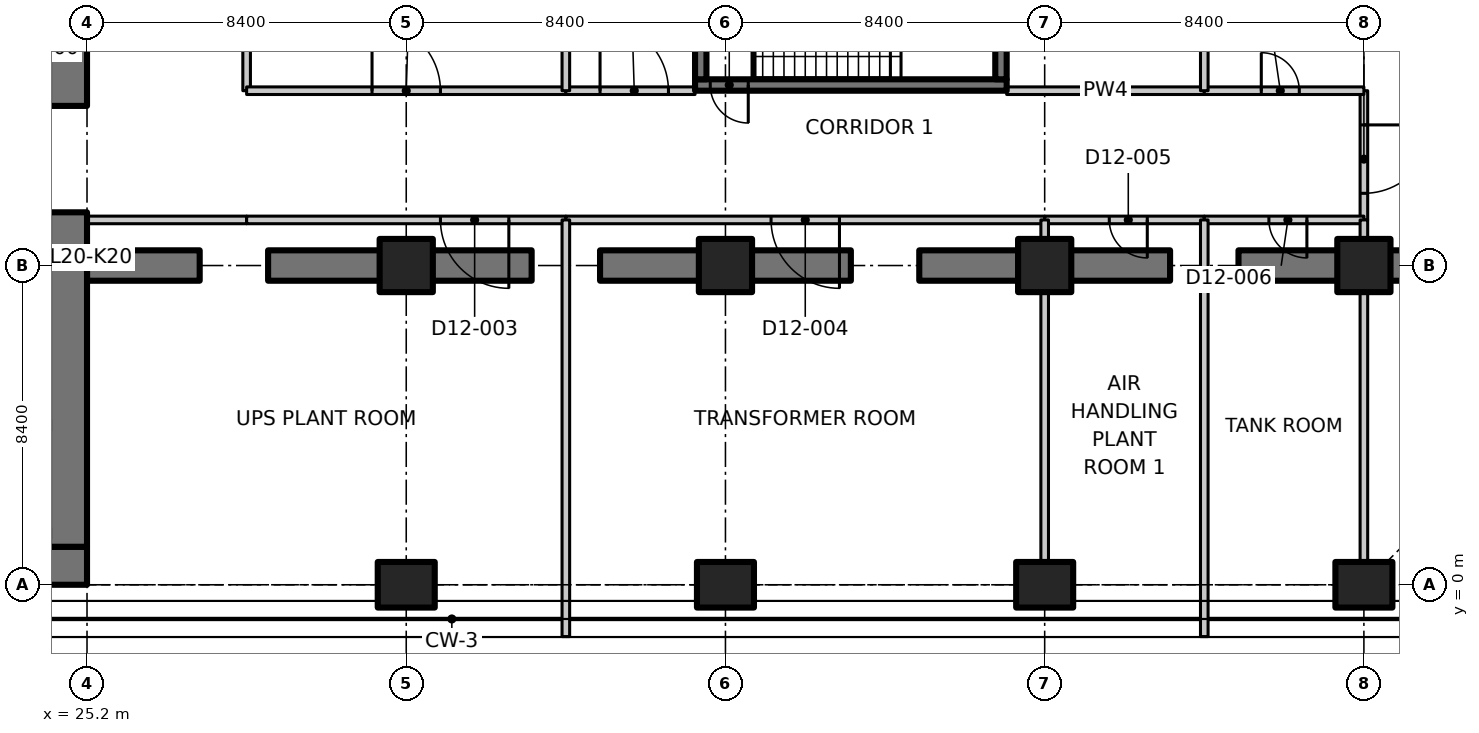
"""IFC4 building model, lengths in metres.
Left out: names, types, materials, properties, quantities, classifications, styles, units other than length and angle.
Written with IfcOpenShell. Run it as: python <this file> out.ifc"""

import sys

from ifc_helpers import new_model, si_unit, direction, frame, frame_2d, origin, origin_2d, place, context, subcontext, project, spatial, polyline, rectangle, outline, extrude, element, fill, save


model = new_model("IFC4")
c1 = context("Model", 3, precision=1e-05, world=origin(), true_north=direction((0.0, 1.0)))
c2 = subcontext(c1, "Body", "Model", "MODEL_VIEW")
j1 = project(units=[si_unit("LENGTHUNIT", "METRE"), si_unit("PLANEANGLEUNIT", "RADIAN")], contexts=[c1])
p1 = place(None, origin())
s1 = spatial("IfcSite", under=j1, at=p1, CompositionType="ELEMENT")
p2 = place(p1, origin())
s2 = spatial("IfcBuilding", under=s1, at=p2, CompositionType="ELEMENT")
p3 = place(p2, frame((0.0, 0.0, 86.9)))
s3 = spatial("IfcBuildingStorey", under=s2, at=p3, CompositionType="ELEMENT", Elevation=86.9)
p4 = place(p3, frame((33.6, 0.0, 0.0), z_axis=(0.0, 0.0, 1.0), x_axis=(0.0, 1.0, 0.0)))
e1 = element("IfcColumn", 1, at=p4, inside=s3, PredefinedType="COLUMN", context=c2, shape_type="SweptSolid", body=[
    extrude(rectangle(XDim=1.2, YDim=1.5, at=origin_2d()), origin(), (0.0, 0.0, 1.0), 4.55),
])
p5 = place(p3, frame((33.6, 8.4, 0.0), z_axis=(0.0, 0.0, 1.0), x_axis=(1.0, 0.0, 0.0)))
e2 = element("IfcColumn", 2, at=p5, inside=s3, PredefinedType="COLUMN", context=c2, shape_type="SweptSolid", body=[
    extrude(rectangle(XDim=1.4, YDim=1.4, at=origin_2d()), origin(), (0.0, 0.0, 1.0), 4.55),
])
p6 = place(p3, frame((42.0, 0.0, 0.0), z_axis=(0.0, 0.0, 1.0), x_axis=(0.0, 1.0, 0.0)))
e3 = element("IfcColumn", 3, at=p6, inside=s3, PredefinedType="COLUMN", context=c2, shape_type="SweptSolid", body=[
    extrude(rectangle(XDim=1.2, YDim=1.5, at=origin_2d()), origin(), (0.0, 0.0, 1.0), 4.55),
])
p7 = place(p3, frame((42.0, 8.4, 0.0), z_axis=(0.0, 0.0, 1.0), x_axis=(1.0, 0.0, 0.0)))
e4 = element("IfcColumn", 4, at=p7, inside=s3, PredefinedType="COLUMN", context=c2, shape_type="SweptSolid", body=[
    extrude(rectangle(XDim=1.4, YDim=1.4, at=origin_2d()), origin(), (0.0, 0.0, 1.0), 4.55),
])
p8 = place(p3, frame((50.4, 0.0, 0.0), z_axis=(0.0, 0.0, 1.0), x_axis=(0.0, 1.0, 0.0)))
e5 = element("IfcColumn", 5, at=p8, inside=s3, PredefinedType="COLUMN", context=c2, shape_type="SweptSolid", body=[
    extrude(rectangle(XDim=1.2, YDim=1.5, at=origin_2d()), origin(), (0.0, 0.0, 1.0), 4.55),
])
p9 = place(p3, frame((50.4, 8.4, 0.0), z_axis=(0.0, 0.0, 1.0), x_axis=(1.0, 0.0, 0.0)))
e6 = element("IfcColumn", 6, at=p9, inside=s3, PredefinedType="COLUMN", context=c2, shape_type="SweptSolid", body=[
    extrude(rectangle(XDim=1.4, YDim=1.4, at=origin_2d()), origin(), (0.0, 0.0, 1.0), 4.55),
])
p10 = place(p3, frame((58.8, 0.0, 0.0), z_axis=(0.0, 0.0, 1.0), x_axis=(0.0, 1.0, 0.0)))
e7 = element("IfcColumn", 7, at=p10, inside=s3, PredefinedType="COLUMN", context=c2, shape_type="SweptSolid", body=[
    extrude(rectangle(XDim=1.2, YDim=1.5, at=origin_2d()), origin(), (0.0, 0.0, 1.0), 4.55),
])
p11 = place(p3, frame((58.8, 8.4, 0.0), z_axis=(0.0, 0.0, 1.0), x_axis=(1.0, 0.0, 0.0)))
e8 = element("IfcColumn", 8, at=p11, inside=s3, PredefinedType="COLUMN", context=c2, shape_type="SweptSolid", body=[
    extrude(rectangle(XDim=1.4, YDim=1.4, at=origin_2d()), origin(), (0.0, 0.0, 1.0), 4.55),
])
p12 = place(p3, frame((25.2, 8.4, 0.0), z_axis=(0.0, 0.0, 1.0), x_axis=(1.0, 0.0, 0.0)))
e9 = element("IfcWall", 9, at=p12, inside=s3, PredefinedType="SHEAR", context=c2, shape_type="SweptSolid", body=[
    extrude(rectangle(XDim=2.965, YDim=0.8, at=frame_2d((1.482, 0.0))), origin(), (0.0, 0.0, 1.0), 4.55),
])
p13 = place(p3, frame((29.965, 8.4, 0.0), z_axis=(0.0, 0.0, 1.0), x_axis=(1.0, 0.0, 0.0)))
e10 = element("IfcWall", 10, at=p13, inside=s3, PredefinedType="SHEAR", context=c2, shape_type="SweptSolid", body=[
    extrude(rectangle(XDim=2.965, YDim=0.8, at=frame_2d((1.482, 0.0))), origin(), (0.0, 0.0, 1.0), 4.55),
])
p14 = place(p3, frame((34.27, 8.4, 0.0), z_axis=(0.0, 0.0, 1.0), x_axis=(1.0, 0.0, 0.0)))
e11 = element("IfcWall", 11, at=p14, inside=s3, PredefinedType="SHEAR", context=c2, shape_type="SweptSolid", body=[
    extrude(rectangle(XDim=2.63, YDim=0.8, at=frame_2d((1.315, 0.0))), origin(), (0.0, 0.0, 1.0), 4.55),
])
for number, where, z_axis, x_axis in (
    (12, (38.7, 8.4, 0.0), (0.0, 0.0, 1.0), (1.0, 0.0, 0.0)),
    (13, (42.67, 8.4, 0.0), (0.0, 0.0, 1.0), (1.0, 0.0, 0.0)),
):
    element("IfcWall", number, at=place(p3, frame(where, z_axis=z_axis, x_axis=x_axis)), inside=s3, PredefinedType="SHEAR", context=c2, shape_type="SweptSolid", body=[
        extrude(rectangle(XDim=2.63, YDim=0.8, at=frame_2d((1.315, 0.0))), origin(), (0.0, 0.0, 1.0), 4.55),
    ])
for number, where, z_axis, x_axis in (
    (14, (47.1, 8.4, 0.0), (0.0, 0.0, 1.0), (1.0, 0.0, 0.0)),
    (15, (51.07, 8.4, 0.0), (0.0, 0.0, 1.0), (1.0, 0.0, 0.0)),
    (16, (55.5, 8.4, 0.0), (0.0, 0.0, 1.0), (1.0, 0.0, 0.0)),
):
    element("IfcWall", number, at=place(p3, frame(where, z_axis=z_axis, x_axis=x_axis)), inside=s3, PredefinedType="SHEAR", context=c2, shape_type="SweptSolid", body=[
        extrude(rectangle(XDim=2.63, YDim=0.8, at=frame_2d((1.315, 0.0))), origin(), (0.0, 0.0, 1.0), 4.55),
    ])
p15 = place(p3, frame((59.47, 8.4, 0.0), z_axis=(0.0, 0.0, 1.0), x_axis=(1.0, 0.0, 0.0)))
e17 = element("IfcWall", 17, at=p15, inside=s3, PredefinedType="SHEAR", context=c2, shape_type="SweptSolid", body=[
    extrude(rectangle(XDim=2.655, YDim=0.8, at=frame_2d((1.328, 0.0))), origin(), (0.0, 0.0, 1.0), 4.55),
])
p16 = place(p3, frame((6.936, 0.5, 0.0), z_axis=(0.0, 0.0, 1.0), x_axis=(1.0, 0.0, 0.0)))
e18 = element("IfcWall", 18, at=p16, inside=s3, PredefinedType="SHEAR", context=c2, shape_type="SweptSolid", body=[
    extrude(rectangle(XDim=18.264, YDim=1.0, at=frame_2d((9.132, 0.0))), origin(), (0.0, 0.0, 1.0), 4.55),
])
p17 = place(p3, frame((24.7, 1.0, 0.0), z_axis=(0.0, 0.0, 1.0), x_axis=(0.0, 1.0, 0.0)))
e19 = element("IfcWall", 19, at=p17, inside=s3, PredefinedType="SHEAR", context=c2, shape_type="SweptSolid", body=[
    extrude(rectangle(XDim=8.8, YDim=1.0, at=frame_2d((4.4, 0.0))), origin(), (0.0, 0.0, 1.0), 4.55),
])
p18 = place(p3, frame((24.7, 12.6, 0.0), z_axis=(0.0, 0.0, 1.0), x_axis=(0.0, 1.0, 0.0)))
e20 = element("IfcWall", 20, at=p18, inside=s3, PredefinedType="SHEAR", context=c2, shape_type="SweptSolid", body=[
    extrude(rectangle(XDim=3.2, YDim=1.0, at=frame_2d((1.6, 0.0))), origin(), (0.0, 0.0, 1.0), 4.55),
])
p19 = place(p3, frame((49.4, 13.15, 0.0), z_axis=(0.0, 0.0, 1.0), x_axis=(-1.0, 0.0, 0.0)))
e21 = element("IfcWall", 21, at=p19, inside=s3, PredefinedType="SHEAR", context=c2, shape_type="SweptSolid", body=[
    extrude(rectangle(XDim=8.2, YDim=0.3, at=frame_2d((4.1, 0.0))), origin(), (0.0, 0.0, 1.0), 4.55),
])
p20 = place(p19, frame((6.8, 0.0, 0.0)))
e22 = element("IfcOpeningElement", 22, at=p20, cuts=e21, PredefinedType="OPENING", context=c2, shape_type="SweptSolid", body=[
    extrude(rectangle(XDim=1.0, YDim=2.1, at=frame_2d((0.5, 1.05))), frame((0.0, 0.16, 0.0), z_axis=(0.0, -1.0, 0.0), x_axis=(1.0, 0.0, 0.0)), (0.0, 0.0, 1.0), 0.32),
])
for number, where, z_axis, x_axis in (
    (23, (41.35, 13.3, 0.0), (0.0, 0.0, 1.0), (0.0, 1.0, 0.0)),
    (24, (49.25, 13.3, 0.0), (0.0, 0.0, 1.0), (0.0, 1.0, 0.0)),
):
    element("IfcWall", number, at=place(p3, frame(where, z_axis=z_axis, x_axis=x_axis)), inside=s3, PredefinedType="SHEAR", context=c2, shape_type="SweptSolid", body=[
        extrude(rectangle(XDim=2.55, YDim=0.3, at=frame_2d((1.275, 0.0))), origin(), (0.0, 0.0, 1.0), 4.55),
    ])
p21 = place(p3, frame((29.4, 9.6, 0.0), z_axis=(0.0, 0.0, 1.0), x_axis=(-1.0, 0.0, 0.0)))
e25 = element("IfcWall", 25, at=p21, inside=s3, PredefinedType="PARTITIONING", context=c2, shape_type="SweptSolid", body=[
    extrude(rectangle(XDim=4.2, YDim=0.2, at=frame_2d((2.1, 0.0))), origin(), (0.0, 0.0, 1.0), 4.53),
])
p22 = place(p3, frame((29.4, 21.2, 0.0), z_axis=(0.0, 0.0, 1.0), x_axis=(0.0, -1.0, 0.0)))
e26 = element("IfcWall", 26, at=p22, inside=s3, PredefinedType="PARTITIONING", context=c2, shape_type="SweptSolid", body=[
    extrude(rectangle(XDim=8.2, YDim=0.2, at=frame_2d((4.1, 0.0))), origin(), (0.0, 0.0, 1.0), 4.53),
])
p23 = place(p3, frame((58.8, 13.0, 0.0), z_axis=(0.0, 0.0, 1.0), x_axis=(0.0, -1.0, 0.0)))
e27 = element("IfcWall", 27, at=p23, inside=s3, PredefinedType="PARTITIONING", context=c2, shape_type="SweptSolid", body=[
    extrude(rectangle(XDim=3.4, YDim=0.2, at=frame_2d((1.7, 0.0))), origin(), (0.0, 0.0, 1.0), 4.53),
])
p24 = place(p23, frame((0.9, 0.0, 0.0)))
e28 = element("IfcOpeningElement", 28, at=p24, cuts=e27, PredefinedType="OPENING", context=c2, shape_type="SweptSolid", body=[
    extrude(rectangle(XDim=1.8, YDim=2.1, at=frame_2d((0.9, 1.05))), frame((0.0, 0.11, 0.0), z_axis=(0.0, -1.0, 0.0), x_axis=(1.0, 0.0, 0.0)), (0.0, 0.0, 1.0), 0.22),
])
p25 = place(p3, frame((37.8, 9.6, 0.0), z_axis=(0.0, 0.0, 1.0), x_axis=(-1.0, 0.0, 0.0)))
e29 = element("IfcWall", 29, at=p25, inside=s3, PredefinedType="PARTITIONING", context=c2, shape_type="SweptSolid", body=[
    extrude(rectangle(XDim=8.4, YDim=0.2, at=frame_2d((4.2, 0.0))), origin(), (0.0, 0.0, 1.0), 4.53),
])
p26 = place(p25, frame((1.5, 0.0, 0.0)))
e30 = element("IfcOpeningElement", 30, at=p26, cuts=e29, PredefinedType="OPENING", context=c2, shape_type="SweptSolid", body=[
    extrude(rectangle(XDim=1.8, YDim=2.1, at=frame_2d((0.9, 1.05))), frame((0.0, 0.11, 0.0), z_axis=(0.0, -1.0, 0.0), x_axis=(1.0, 0.0, 0.0)), (0.0, 0.0, 1.0), 0.22),
])
p27 = place(p3, frame((50.4, 9.6, 0.0), z_axis=(0.0, 0.0, 1.0), x_axis=(-1.0, 0.0, 0.0)))
e31 = element("IfcWall", 31, at=p27, inside=s3, PredefinedType="PARTITIONING", context=c2, shape_type="SweptSolid", body=[
    extrude(rectangle(XDim=12.6, YDim=0.2, at=frame_2d((6.3, 0.0))), origin(), (0.0, 0.0, 1.0), 4.53),
])
p28 = place(p27, frame((5.4, 0.0, 0.0)))
e32 = element("IfcOpeningElement", 32, at=p28, cuts=e31, PredefinedType="OPENING", context=c2, shape_type="SweptSolid", body=[
    extrude(rectangle(XDim=1.8, YDim=2.1, at=frame_2d((0.9, 1.05))), frame((0.0, 0.11, 0.0), z_axis=(0.0, -1.0, 0.0), x_axis=(1.0, 0.0, 0.0)), (0.0, 0.0, 1.0), 0.22),
])
p29 = place(p3, frame((54.6, 9.6, 0.0), z_axis=(0.0, 0.0, 1.0), x_axis=(-1.0, 0.0, 0.0)))
e33 = element("IfcWall", 33, at=p29, inside=s3, PredefinedType="PARTITIONING", context=c2, shape_type="SweptSolid", body=[
    extrude(rectangle(XDim=4.2, YDim=0.2, at=frame_2d((2.1, 0.0))), origin(), (0.0, 0.0, 1.0), 4.53),
])
p30 = place(p29, frame((1.5, 0.0, 0.0)))
e34 = element("IfcOpeningElement", 34, at=p30, cuts=e33, PredefinedType="OPENING", context=c2, shape_type="SweptSolid", body=[
    extrude(rectangle(XDim=1.0, YDim=2.1, at=frame_2d((0.5, 1.05))), frame((0.0, 0.11, 0.0), z_axis=(0.0, -1.0, 0.0), x_axis=(1.0, 0.0, 0.0)), (0.0, 0.0, 1.0), 0.22),
])
p31 = place(p3, frame((58.8, 9.6, 0.0), z_axis=(0.0, 0.0, 1.0), x_axis=(-1.0, 0.0, 0.0)))
e35 = element("IfcWall", 35, at=p31, inside=s3, PredefinedType="PARTITIONING", context=c2, shape_type="SweptSolid", body=[
    extrude(rectangle(XDim=4.2, YDim=0.2, at=frame_2d((2.1, 0.0))), origin(), (0.0, 0.0, 1.0), 4.53),
])
p32 = place(p31, frame((1.5, 0.0, 0.0)))
e36 = element("IfcOpeningElement", 36, at=p32, cuts=e35, PredefinedType="OPENING", context=c2, shape_type="SweptSolid", body=[
    extrude(rectangle(XDim=1.0, YDim=2.1, at=frame_2d((0.5, 1.05))), frame((0.0, 0.11, 0.0), z_axis=(0.0, -1.0, 0.0), x_axis=(1.0, 0.0, 0.0)), (0.0, 0.0, 1.0), 0.22),
])
p33 = place(p3, frame((29.4, 13.0, 0.0), z_axis=(0.0, 0.0, 1.0), x_axis=(1.0, 0.0, 0.0)))
e37 = element("IfcWall", 37, at=p33, inside=s3, PredefinedType="PARTITIONING", context=c2, shape_type="SweptSolid", body=[
    extrude(rectangle(XDim=8.4, YDim=0.2, at=frame_2d((4.2, 0.0))), origin(), (0.0, 0.0, 1.0), 4.53),
])
p34 = place(p33, frame((3.3, 0.0, 0.0)))
e38 = element("IfcOpeningElement", 38, at=p34, cuts=e37, PredefinedType="OPENING", context=c2, shape_type="SweptSolid", body=[
    extrude(rectangle(XDim=1.8, YDim=2.1, at=frame_2d((0.9, 1.05))), frame((0.0, 0.11, 0.0), z_axis=(0.0, -1.0, 0.0), x_axis=(1.0, 0.0, 0.0)), (0.0, 0.0, 1.0), 0.22),
])
p35 = place(p3, frame((37.8, 13.0, 0.0), z_axis=(0.0, 0.0, 1.0), x_axis=(1.0, 0.0, 0.0)))
e39 = element("IfcWall", 39, at=p35, inside=s3, PredefinedType="PARTITIONING", context=c2, shape_type="SweptSolid", body=[
    extrude(rectangle(XDim=3.4, YDim=0.2, at=frame_2d((1.7, 0.0))), origin(), (0.0, 0.0, 1.0), 4.53),
])
p36 = place(p35, frame((0.9, 0.0, 0.0)))
e40 = element("IfcOpeningElement", 40, at=p36, cuts=e39, PredefinedType="OPENING", context=c2, shape_type="SweptSolid", body=[
    extrude(rectangle(XDim=1.8, YDim=2.1, at=frame_2d((0.9, 1.05))), frame((0.0, 0.11, 0.0), z_axis=(0.0, -1.0, 0.0), x_axis=(1.0, 0.0, 0.0)), (0.0, 0.0, 1.0), 0.22),
])
p37 = place(p3, frame((49.4, 13.0, 0.0), z_axis=(0.0, 0.0, 1.0), x_axis=(1.0, 0.0, 0.0)))
e41 = element("IfcWall", 41, at=p37, inside=s3, PredefinedType="PARTITIONING", context=c2, shape_type="SweptSolid", body=[
    extrude(rectangle(XDim=5.2, YDim=0.2, at=frame_2d((2.6, 0.0))), origin(), (0.0, 0.0, 1.0), 4.53),
])
p38 = place(p3, frame((54.6, 13.0, 0.0), z_axis=(0.0, 0.0, 1.0), x_axis=(1.0, 0.0, 0.0)))
e42 = element("IfcWall", 42, at=p38, inside=s3, PredefinedType="PARTITIONING", context=c2, shape_type="SweptSolid", body=[
    extrude(rectangle(XDim=4.2, YDim=0.2, at=frame_2d((2.1, 0.0))), origin(), (0.0, 0.0, 1.0), 4.53),
])
p39 = place(p38, frame((1.5, 0.0, 0.0)))
e43 = element("IfcOpeningElement", 43, at=p39, cuts=e42, PredefinedType="OPENING", context=c2, shape_type="SweptSolid", body=[
    extrude(rectangle(XDim=1.0, YDim=2.1, at=frame_2d((0.5, 1.05))), frame((0.0, 0.11, 0.0), z_axis=(0.0, -1.0, 0.0), x_axis=(1.0, 0.0, 0.0)), (0.0, 0.0, 1.0), 0.22),
])
p40 = place(p3, frame((58.8, 0.62, 0.0), z_axis=(0.0, 0.0, 1.0), x_axis=(0.0, 1.0, 0.0)))
e44 = element("IfcWall", 44, at=p40, inside=s3, PredefinedType="PARTITIONING", context=c2, shape_type="SweptSolid", body=[
    extrude(outline(polyline([(0.0, 0.0), (7.06, 0.0), (7.06, 4.53), (0.096, 4.53), (0.094, 4.18), (0.0, 4.18), (0.0, 0.0)])), frame((0.0, 0.1, 0.0), z_axis=(0.0, -1.0, 0.0), x_axis=(1.0, 0.0, 0.0)), (0.0, 0.0, 1.0), 0.2),
])
p41 = place(p3, frame((58.8, 9.12, 0.0), z_axis=(0.0, 0.0, 1.0), x_axis=(0.0, 1.0, 0.0)))
e45 = element("IfcWall", 45, at=p41, inside=s3, PredefinedType="PARTITIONING", context=c2, shape_type="SweptSolid", body=[
    extrude(rectangle(XDim=0.48, YDim=0.2, at=frame_2d((0.24, 0.0))), origin(), (0.0, 0.0, 1.0), 4.53),
])
p42 = place(p3, frame((37.8, 9.6, 0.0), z_axis=(0.0, 0.0, 1.0), x_axis=(0.0, -1.0, 0.0)))
e46 = element("IfcWall", 46, at=p42, inside=s3, PredefinedType="PARTITIONING", context=c2, shape_type="SweptSolid", body=[
    extrude(outline(polyline([(0.0, 0.0), (10.963, 0.0), (10.963, 4.53), (10.7, 4.53), (10.05, 4.53), (10.048, 4.18), (9.152, 4.18), (9.15, 4.53), (0.0, 4.53), (0.0, 0.0)])), frame((0.0, 0.1, 0.0), z_axis=(0.0, -1.0, 0.0), x_axis=(1.0, 0.0, 0.0)), (0.0, 0.0, 1.0), 0.2),
])
p43 = place(p3, frame((50.4, 9.6, 0.0), z_axis=(0.0, 0.0, 1.0), x_axis=(0.0, -1.0, 0.0)))
e47 = element("IfcWall", 47, at=p43, inside=s3, PredefinedType="PARTITIONING", context=c2, shape_type="SweptSolid", body=[
    extrude(rectangle(XDim=0.48, YDim=0.2, at=frame_2d((0.24, 0.0))), origin(), (0.0, 0.0, 1.0), 4.53),
])
p44 = place(p3, frame((50.4, 7.68, 0.0), z_axis=(0.0, 0.0, 1.0), x_axis=(0.0, -1.0, 0.0)))
e48 = element("IfcWall", 48, at=p44, inside=s3, PredefinedType="PARTITIONING", context=c2, shape_type="SweptSolid", body=[
    extrude(rectangle(XDim=7.06, YDim=0.2, at=frame_2d((3.53, 0.0))), origin(), (0.0, 0.0, 1.0), 4.53),
])
p45 = place(p3, frame((54.6, 9.6, 0.0), z_axis=(0.0, 0.0, 1.0), x_axis=(0.0, -1.0, 0.0)))
e49 = element("IfcWall", 49, at=p45, inside=s3, PredefinedType="PARTITIONING", context=c2, shape_type="SweptSolid", body=[
    extrude(outline(polyline([(0.0, 0.0), (10.963, 0.0), (10.963, 4.53), (10.7, 4.53), (10.05, 4.53), (10.048, 4.18), (9.152, 4.18), (9.15, 4.53), (0.0, 4.53), (0.0, 0.0)])), frame((0.0, 0.1, 0.0), z_axis=(0.0, -1.0, 0.0), x_axis=(1.0, 0.0, 0.0)), (0.0, 0.0, 1.0), 0.2),
])
p46 = place(p3, frame((37.8, 30.243, 0.0), z_axis=(0.0, 0.0, 1.0), x_axis=(0.0, -1.0, 0.0)))
e50 = element("IfcWall", 50, at=p46, inside=s3, PredefinedType="PARTITIONING", context=c2, shape_type="SweptSolid", body=[
    extrude(outline(polyline([(0.0, 0.0), (17.243, 0.0), (17.243, 4.53), (5.493, 4.53), (5.491, 4.18), (4.595, 4.18), (4.593, 4.53), (0.0, 4.53), (0.0, 0.0)])), frame((0.0, 0.1, 0.0), z_axis=(0.0, -1.0, 0.0), x_axis=(1.0, 0.0, 0.0)), (0.0, 0.0, 1.0), 0.2),
])
p47 = place(p3, frame((54.6, 26.375, 0.0), z_axis=(0.0, 0.0, 1.0), x_axis=(0.0, -1.0, 0.0)))
e51 = element("IfcWall", 51, at=p47, inside=s3, PredefinedType="PARTITIONING", context=c2, shape_type="SweptSolid", body=[
    extrude(outline(polyline([(0.0, 0.0), (13.375, 0.0), (13.375, 4.53), (1.625, 4.53), (1.624, 4.18), (0.728, 4.18), (0.726, 4.53), (0.075, 4.53), (0.0, 4.53), (0.0, 0.0)])), frame((0.0, 0.1, 0.0), z_axis=(0.0, -1.0, 0.0), x_axis=(1.0, 0.0, 0.0)), (0.0, 0.0, 1.0), 0.2),
])
p48 = place(p20, origin())
e52 = element("IfcDoor", 52, at=p48, inside=s3, OperationType="SINGLE_SWING_LEFT", PredefinedType="DOOR", context=c2, shape_type="SweptSolid", body=[
    extrude(rectangle(XDim=1.0, YDim=2.1, at=frame_2d((0.5, 1.05))), frame((0.0, 0.025, 0.0), z_axis=(0.0, -1.0, 0.0), x_axis=(1.0, 0.0, 0.0)), (0.0, 0.0, 1.0), 0.05),
])
fill(e22, e52)
p49 = place(p24, origin())
e53 = element("IfcDoor", 53, at=p49, inside=s3, OperationType="DOUBLE_DOOR_SINGLE_SWING", PredefinedType="DOOR", context=c2, shape_type="SweptSolid", body=[
    extrude(rectangle(XDim=1.8, YDim=2.1, at=frame_2d((0.9, 1.05))), frame((0.0, 0.025, 0.0), z_axis=(0.0, -1.0, 0.0), x_axis=(1.0, 0.0, 0.0)), (0.0, 0.0, 1.0), 0.05),
])
fill(e28, e53)
p50 = place(p26, origin())
e54 = element("IfcDoor", 54, at=p50, inside=s3, OperationType="DOUBLE_DOOR_SINGLE_SWING", PredefinedType="DOOR", context=c2, shape_type="SweptSolid", body=[
    extrude(rectangle(XDim=1.8, YDim=2.1, at=frame_2d((0.9, 1.05))), frame((0.0, 0.025, 0.0), z_axis=(0.0, -1.0, 0.0), x_axis=(1.0, 0.0, 0.0)), (0.0, 0.0, 1.0), 0.05),
])
fill(e30, e54)
p51 = place(p28, origin())
e55 = element("IfcDoor", 55, at=p51, inside=s3, OperationType="DOUBLE_DOOR_SINGLE_SWING", PredefinedType="DOOR", context=c2, shape_type="SweptSolid", body=[
    extrude(rectangle(XDim=1.8, YDim=2.1, at=frame_2d((0.9, 1.05))), frame((0.0, 0.025, 0.0), z_axis=(0.0, -1.0, 0.0), x_axis=(1.0, 0.0, 0.0)), (0.0, 0.0, 1.0), 0.05),
])
fill(e32, e55)
p52 = place(p30, origin())
e56 = element("IfcDoor", 56, at=p52, inside=s3, OperationType="SINGLE_SWING_LEFT", PredefinedType="DOOR", context=c2, shape_type="SweptSolid", body=[
    extrude(rectangle(XDim=1.0, YDim=2.1, at=frame_2d((0.5, 1.05))), frame((0.0, 0.025, 0.0), z_axis=(0.0, -1.0, 0.0), x_axis=(1.0, 0.0, 0.0)), (0.0, 0.0, 1.0), 0.05),
])
fill(e34, e56)
p53 = place(p32, origin())
e57 = element("IfcDoor", 57, at=p53, inside=s3, OperationType="SINGLE_SWING_LEFT", PredefinedType="DOOR", context=c2, shape_type="SweptSolid", body=[
    extrude(rectangle(XDim=1.0, YDim=2.1, at=frame_2d((0.5, 1.05))), frame((0.0, 0.025, 0.0), z_axis=(0.0, -1.0, 0.0), x_axis=(1.0, 0.0, 0.0)), (0.0, 0.0, 1.0), 0.05),
])
fill(e36, e57)
p54 = place(p34, origin())
e58 = element("IfcDoor", 58, at=p54, inside=s3, OperationType="DOUBLE_DOOR_SINGLE_SWING", PredefinedType="DOOR", context=c2, shape_type="SweptSolid", body=[
    extrude(rectangle(XDim=1.8, YDim=2.1, at=frame_2d((0.9, 1.05))), frame((0.0, 0.025, 0.0), z_axis=(0.0, -1.0, 0.0), x_axis=(1.0, 0.0, 0.0)), (0.0, 0.0, 1.0), 0.05),
])
fill(e38, e58)
p55 = place(p36, origin())
e59 = element("IfcDoor", 59, at=p55, inside=s3, OperationType="DOUBLE_DOOR_SINGLE_SWING", PredefinedType="DOOR", context=c2, shape_type="SweptSolid", body=[
    extrude(rectangle(XDim=1.8, YDim=2.1, at=frame_2d((0.9, 1.05))), frame((0.0, 0.025, 0.0), z_axis=(0.0, -1.0, 0.0), x_axis=(1.0, 0.0, 0.0)), (0.0, 0.0, 1.0), 0.05),
])
fill(e40, e59)
p56 = place(p39, origin())
e60 = element("IfcDoor", 60, at=p56, inside=s3, OperationType="SINGLE_SWING_LEFT", PredefinedType="DOOR", context=c2, shape_type="SweptSolid", body=[
    extrude(rectangle(XDim=1.0, YDim=2.1, at=frame_2d((0.5, 1.05))), frame((0.0, 0.025, 0.0), z_axis=(0.0, -1.0, 0.0), x_axis=(1.0, 0.0, 0.0)), (0.0, 0.0, 1.0), 0.05),
])
fill(e43, e60)
save(model, sys.argv[1])
